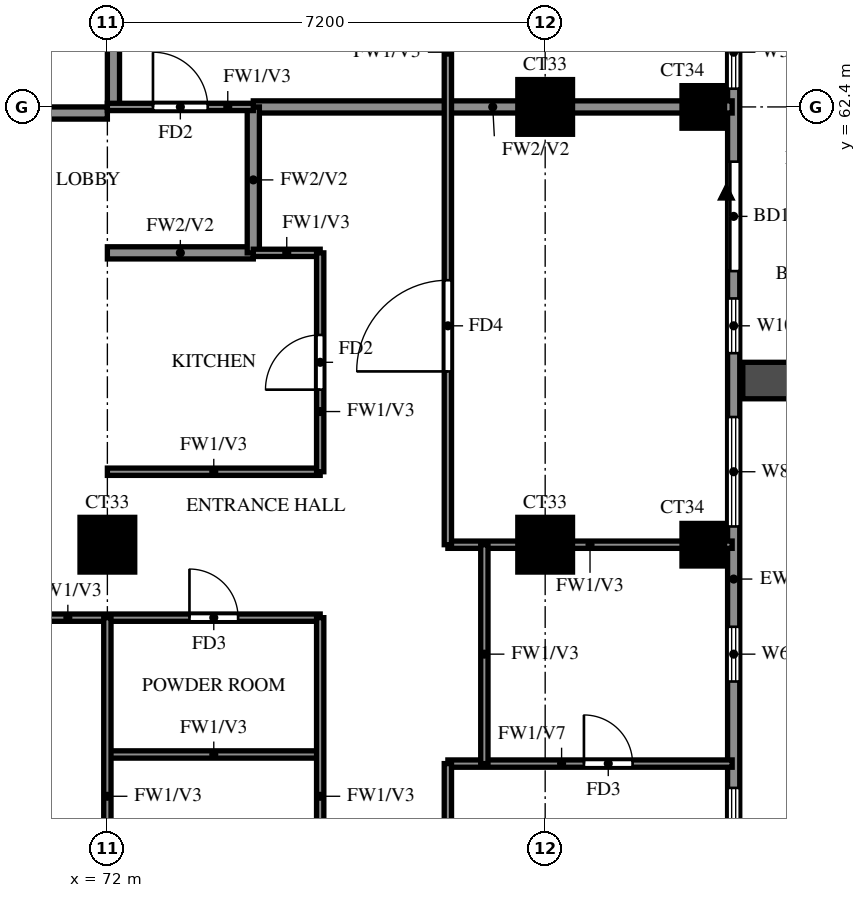
"""IFC4 building model, lengths in metres.
Left out: names, types, materials, properties, quantities, classifications, styles, units other than length and angle.
Written with IfcOpenShell. Run it as: python <this file> out.ifc"""

import sys

from ifc_helpers import new_model, si_unit, direction, frame, frame_2d, origin, origin_2d, place, context, subcontext, project, spatial, rectangle, extrude, source, transform, mapped, element, fill, save


model = new_model("IFC4")
c1 = context("Model", 3, precision=1e-05, world=origin(), true_north=direction((0.0, 1.0)))
c2 = subcontext(c1, "Body", "Model", "MODEL_VIEW")
j1 = project(units=[si_unit("LENGTHUNIT", "METRE"), si_unit("PLANEANGLEUNIT", "RADIAN")], contexts=[c1])
p1 = place(None, origin())
s1 = spatial("IfcSite", under=j1, at=p1, CompositionType="ELEMENT")
p2 = place(p1, origin())
s2 = spatial("IfcBuilding", under=s1, at=p2, CompositionType="ELEMENT")
p3 = place(p2, frame((0.0, 0.0, 222.0)))
s3 = spatial("IfcBuildingStorey", under=s2, at=p3, CompositionType="ELEMENT", Elevation=222.0)
m1 = source(origin(), c2, "Body", "SweptSolid", [
    extrude(rectangle(XDim=0.9, YDim=0.9, at=origin_2d()), origin(), (0.0, 0.0, 1.0), 3.22),
])
for number, where, z_axis, x_axis in (
    (1, (72.0, 55.2, 0.0), (0.0, 0.0, 1.0), (1.0, 0.0, 0.0)),
    (2, (79.2, 55.2, 0.0), (0.0, 0.0, 1.0), (1.0, 0.0, 0.0)),
):
    element("IfcColumn", number, at=place(p3, frame(where, z_axis=z_axis, x_axis=x_axis)), inside=s3, PredefinedType="COLUMN", context=c2, shape_type="MappedRepresentation", body=[
        mapped(m1, transform((0.0, 0.0, 0.0))),
    ])
m2 = source(origin(), c2, "Body", "SweptSolid", [
    extrude(rectangle(XDim=0.7, YDim=0.7, at=origin_2d()), origin(), (0.0, 0.0, 1.0), 3.22),
])
p4 = place(p3, frame((81.8, 55.2, 0.0), z_axis=(0.0, 0.0, 1.0), x_axis=(1.0, 0.0, 0.0)))
e3 = element("IfcColumn", 3, at=p4, inside=s3, PredefinedType="COLUMN", context=c2, shape_type="MappedRepresentation", body=[
    mapped(m2, transform((0.0, 0.0, 0.0))),
])
p5 = place(p3, frame((79.2, 62.4, 0.0), z_axis=(0.0, 0.0, 1.0), x_axis=(1.0, 0.0, 0.0)))
e4 = element("IfcColumn", 4, at=p5, inside=s3, PredefinedType="COLUMN", context=c2, shape_type="MappedRepresentation", body=[
    mapped(m1, transform((0.0, 0.0, 0.0))),
])
p6 = place(p3, frame((81.8, 62.4, 0.0), z_axis=(0.0, 0.0, 1.0), x_axis=(1.0, 0.0, 0.0)))
e5 = element("IfcColumn", 5, at=p6, inside=s3, PredefinedType="COLUMN", context=c2, shape_type="MappedRepresentation", body=[
    mapped(m2, transform((0.0, 0.0, 0.0))),
])
p7 = place(p3, frame((82.3, 48.2, 0.0), z_axis=(0.0, 0.0, 1.0), x_axis=(0.0, 1.0, 0.0)))
e6 = element("IfcWall", 6, at=p7, inside=s3, PredefinedType="SOLIDWALL", context=c2, shape_type="SweptSolid", body=[
    extrude(rectangle(XDim=28.6, YDim=0.2, at=frame_2d((14.3, 0.0))), origin(), (0.0, 0.0, 1.0), 3.22),
])
p8 = place(p7, frame((11.5, 0.0, 0.0)))
e7 = element("IfcOpeningElement", 7, at=p8, cuts=e6, PredefinedType="OPENING", context=c2, shape_type="SweptSolid", body=[
    extrude(rectangle(XDim=1.8, YDim=2.4, at=frame_2d((0.9, 1.2))), frame((0.0, 0.11, 0.0), z_axis=(0.0, -1.0, 0.0), x_axis=(1.0, 0.0, 0.0)), (0.0, 0.0, 1.0), 0.22),
])
p9 = place(p7, frame((0.6, 0.0, 0.6)))
e8 = element("IfcOpeningElement", 8, at=p9, cuts=e6, PredefinedType="OPENING", context=c2, shape_type="SweptSolid", body=[
    extrude(rectangle(XDim=2.4, YDim=2.4, at=frame_2d((1.2, 1.2))), frame((0.0, 0.11, 0.0), z_axis=(0.0, -1.0, 0.0), x_axis=(1.0, 0.0, 0.0)), (0.0, 0.0, 1.0), 0.22),
])
p10 = place(p7, frame((4.75, 0.0, 1.5)))
e9 = element("IfcOpeningElement", 9, at=p10, cuts=e6, PredefinedType="OPENING", context=c2, shape_type="SweptSolid", body=[
    extrude(rectangle(XDim=0.9, YDim=0.9, at=frame_2d((0.45, 0.45))), frame((0.0, 0.11, 0.0), z_axis=(0.0, -1.0, 0.0), x_axis=(1.0, 0.0, 0.0)), (0.0, 0.0, 1.0), 0.22),
])
p11 = place(p7, frame((7.3, 0.0, 0.6)))
e10 = element("IfcOpeningElement", 10, at=p11, cuts=e6, PredefinedType="OPENING", context=c2, shape_type="SweptSolid", body=[
    extrude(rectangle(XDim=1.8, YDim=2.4, at=frame_2d((0.9, 1.2))), frame((0.0, 0.11, 0.0), z_axis=(0.0, -1.0, 0.0), x_axis=(1.0, 0.0, 0.0)), (0.0, 0.0, 1.0), 0.22),
])
p12 = place(p7, frame((10.15, 0.0, 0.6)))
e11 = element("IfcOpeningElement", 11, at=p12, cuts=e6, PredefinedType="OPENING", context=c2, shape_type="SweptSolid", body=[
    extrude(rectangle(XDim=0.9, YDim=2.4, at=frame_2d((0.45, 1.2))), frame((0.0, 0.11, 0.0), z_axis=(0.0, -1.0, 0.0), x_axis=(1.0, 0.0, 0.0)), (0.0, 0.0, 1.0), 0.22),
])
p13 = place(p7, frame((14.5, 0.0, 0.6)))
e12 = element("IfcOpeningElement", 12, at=p13, cuts=e6, PredefinedType="OPENING", context=c2, shape_type="SweptSolid", body=[
    extrude(rectangle(XDim=1.2, YDim=2.4, at=frame_2d((0.6, 1.2))), frame((0.0, 0.11, 0.0), z_axis=(0.0, -1.0, 0.0), x_axis=(1.0, 0.0, 0.0)), (0.0, 0.0, 1.0), 0.22),
])
p14 = place(p7, frame((16.75, 0.0, 0.6)))
e13 = element("IfcOpeningElement", 13, at=p14, cuts=e6, PredefinedType="OPENING", context=c2, shape_type="SweptSolid", body=[
    extrude(rectangle(XDim=0.9, YDim=2.4, at=frame_2d((0.45, 1.2))), frame((0.0, 0.11, 0.0), z_axis=(0.0, -1.0, 0.0), x_axis=(1.0, 0.0, 0.0)), (0.0, 0.0, 1.0), 0.22),
])
p15 = place(p7, frame((18.4, 0.0, 0.6)))
e14 = element("IfcOpeningElement", 14, at=p15, cuts=e6, PredefinedType="OPENING", context=c2, shape_type="SweptSolid", body=[
    extrude(rectangle(XDim=2.4, YDim=2.4, at=frame_2d((1.2, 1.2))), frame((0.0, 0.11, 0.0), z_axis=(0.0, -1.0, 0.0), x_axis=(1.0, 0.0, 0.0)), (0.0, 0.0, 1.0), 0.22),
])
p16 = place(p7, frame((22.0, 0.0, 0.6)))
e15 = element("IfcOpeningElement", 15, at=p16, cuts=e6, PredefinedType="OPENING", context=c2, shape_type="SweptSolid", body=[
    extrude(rectangle(XDim=2.4, YDim=2.4, at=frame_2d((1.2, 1.2))), frame((0.0, 0.11, 0.0), z_axis=(0.0, -1.0, 0.0), x_axis=(1.0, 0.0, 0.0)), (0.0, 0.0, 1.0), 0.22),
])
p17 = place(p7, frame((25.5, 0.0, 0.6)))
e16 = element("IfcOpeningElement", 16, at=p17, cuts=e6, PredefinedType="OPENING", context=c2, shape_type="SweptSolid", body=[
    extrude(rectangle(XDim=2.4, YDim=2.4, at=frame_2d((1.2, 1.2))), frame((0.0, 0.11, 0.0), z_axis=(0.0, -1.0, 0.0), x_axis=(1.0, 0.0, 0.0)), (0.0, 0.0, 1.0), 0.22),
])
p18 = place(p3, frame((82.45, 57.9, 0.0), z_axis=(0.0, 0.0, 1.0), x_axis=(1.0, 0.0, 0.0)))
e17 = element("IfcWall", 17, at=p18, inside=s3, PredefinedType="SOLIDWALL", context=c2, shape_type="SweptSolid", body=[
    extrude(rectangle(XDim=2.65, YDim=0.6, at=frame_2d((1.325, 0.0))), origin(), (0.0, 0.0, 1.0), 2.85),
])
p19 = place(p3, frame((67.2, 62.3, 0.0), z_axis=(0.0, 0.0, 1.0), x_axis=(1.0, 0.0, 0.0)))
e18 = element("IfcWall", 18, at=p19, inside=s3, PredefinedType="SOLIDWALL", context=c2, shape_type="SweptSolid", body=[
    extrude(rectangle(XDim=4.8, YDim=0.2, at=frame_2d((2.4, 0.0))), origin(), (0.0, 0.0, 1.0), 3.22),
])
p20 = place(p3, frame((72.1, 62.4, 0.0), z_axis=(0.0, 0.0, 1.0), x_axis=(0.0, 1.0, 0.0)))
e19 = element("IfcWall", 19, at=p20, inside=s3, PredefinedType="SOLIDWALL", context=c2, shape_type="SweptSolid", body=[
    extrude(rectangle(XDim=15.6, YDim=0.2, at=frame_2d((7.8, 0.0))), origin(), (0.0, 0.0, 1.0), 3.22),
])
p21 = place(p3, frame((72.0, 60.0, 0.0), z_axis=(0.0, 0.0, 1.0), x_axis=(1.0, 0.0, 0.0)))
e20 = element("IfcWall", 20, at=p21, inside=s3, PredefinedType="SOLIDWALL", context=c2, shape_type="SweptSolid", body=[
    extrude(rectangle(XDim=2.4, YDim=0.2, at=frame_2d((1.2, 0.0))), origin(), (0.0, 0.0, 1.0), 3.22),
])
p22 = place(p3, frame((74.4, 62.4, 0.0), z_axis=(0.0, 0.0, 1.0), x_axis=(1.0, 0.0, 0.0)))
e21 = element("IfcWall", 21, at=p22, inside=s3, PredefinedType="SOLIDWALL", context=c2, shape_type="SweptSolid", body=[
    extrude(rectangle(XDim=7.875, YDim=0.2, at=frame_2d((3.938, 0.0))), origin(), (0.0, 0.0, 1.0), 3.22),
])
p23 = place(p3, frame((74.4, 60.0, 0.0), z_axis=(0.0, 0.0, 1.0), x_axis=(0.0, 1.0, 0.0)))
e22 = element("IfcWall", 22, at=p23, inside=s3, PredefinedType="SOLIDWALL", context=c2, shape_type="SweptSolid", body=[
    extrude(rectangle(XDim=2.4, YDim=0.2, at=frame_2d((1.2, 0.0))), origin(), (0.0, 0.0, 1.0), 3.22),
])
p24 = place(p3, frame((77.6, 51.6, 0.0), z_axis=(0.0, 0.0, 1.0), x_axis=(1.0, 0.0, 0.0)))
e23 = element("IfcWall", 23, at=p24, inside=s3, PredefinedType="PARTITIONING", context=c2, shape_type="SweptSolid", body=[
    extrude(rectangle(XDim=4.675, YDim=0.12, at=frame_2d((2.337, 0.0))), origin(), (0.0, 0.0, 1.0), 2.32),
])
p25 = place(p24, frame((2.238, 0.0, 0.0)))
e24 = element("IfcOpeningElement", 24, at=p25, cuts=e23, PredefinedType="OPENING", context=c2, shape_type="SweptSolid", body=[
    extrude(rectangle(XDim=0.8, YDim=2.1, at=frame_2d((0.4, 1.05))), frame((0.0, 0.07, 0.0), z_axis=(0.0, -1.0, 0.0), x_axis=(1.0, 0.0, 0.0)), (0.0, 0.0, 1.0), 0.14),
])
p26 = place(p3, frame((72.0, 51.75, 0.0), z_axis=(0.0, 0.0, 1.0), x_axis=(1.0, 0.0, 0.0)))
e25 = element("IfcWall", 25, at=p26, inside=s3, PredefinedType="PARTITIONING", context=c2, shape_type="SweptSolid", body=[
    extrude(rectangle(XDim=3.5, YDim=0.12, at=frame_2d((1.75, 0.0))), origin(), (0.0, 0.0, 1.0), 3.22),
])
p27 = place(p3, frame((67.2, 54.0, 0.0), z_axis=(0.0, 0.0, 1.0), x_axis=(1.0, 0.0, 0.0)))
e26 = element("IfcWall", 26, at=p27, inside=s3, PredefinedType="PARTITIONING", context=c2, shape_type="SweptSolid", body=[
    extrude(rectangle(XDim=8.3, YDim=0.12, at=frame_2d((4.15, 0.0))), origin(), (0.0, 0.0, 1.0), 3.22),
])
p28 = place(p27, frame((6.15, 0.0, 0.0)))
e27 = element("IfcOpeningElement", 27, at=p28, cuts=e26, PredefinedType="OPENING", context=c2, shape_type="SweptSolid", body=[
    extrude(rectangle(XDim=0.8, YDim=2.1, at=frame_2d((0.4, 1.05))), frame((0.0, 0.07, 0.0), z_axis=(0.0, -1.0, 0.0), x_axis=(1.0, 0.0, 0.0)), (0.0, 0.0, 1.0), 0.14),
])
p29 = place(p27, frame((1.95, 0.0, 0.0)))
e28 = element("IfcOpeningElement", 28, at=p29, cuts=e26, PredefinedType="OPENING", context=c2, shape_type="SweptSolid", body=[
    extrude(rectangle(XDim=0.9, YDim=2.1, at=frame_2d((0.45, 1.05))), frame((0.0, 0.07, 0.0), z_axis=(0.0, -1.0, 0.0), x_axis=(1.0, 0.0, 0.0)), (0.0, 0.0, 1.0), 0.14),
])
p30 = place(p3, frame((77.6, 55.2, 0.0), z_axis=(0.0, 0.0, 1.0), x_axis=(1.0, 0.0, 0.0)))
e29 = element("IfcWall", 29, at=p30, inside=s3, PredefinedType="PARTITIONING", context=c2, shape_type="SweptSolid", body=[
    extrude(rectangle(XDim=4.675, YDim=0.12, at=frame_2d((2.337, 0.0))), origin(), (0.0, 0.0, 1.0), 3.22),
])
p31 = place(p3, frame((72.0, 56.4, 0.0), z_axis=(0.0, 0.0, 1.0), x_axis=(1.0, 0.0, 0.0)))
e30 = element("IfcWall", 30, at=p31, inside=s3, PredefinedType="PARTITIONING", context=c2, shape_type="SweptSolid", body=[
    extrude(rectangle(XDim=3.5, YDim=0.12, at=frame_2d((1.75, 0.0))), origin(), (0.0, 0.0, 1.0), 3.22),
])
p32 = place(p3, frame((74.4, 60.0, 0.0), z_axis=(0.0, 0.0, 1.0), x_axis=(1.0, 0.0, 0.0)))
e31 = element("IfcWall", 31, at=p32, inside=s3, PredefinedType="PARTITIONING", context=c2, shape_type="SweptSolid", body=[
    extrude(rectangle(XDim=1.1, YDim=0.12, at=frame_2d((0.55, 0.0))), origin(), (0.0, 0.0, 1.0), 3.22),
])
p33 = place(p3, frame((72.0, 62.4, 0.0), z_axis=(0.0, 0.0, 1.0), x_axis=(1.0, 0.0, 0.0)))
e32 = element("IfcWall", 32, at=p33, inside=s3, PredefinedType="PARTITIONING", context=c2, shape_type="SweptSolid", body=[
    extrude(rectangle(XDim=2.4, YDim=0.12, at=frame_2d((1.2, 0.0))), origin(), (0.0, 0.0, 1.0), 3.22),
])
p34 = place(p33, frame((0.75, 0.0, 0.0)))
e33 = element("IfcOpeningElement", 33, at=p34, cuts=e32, PredefinedType="OPENING", context=c2, shape_type="SweptSolid", body=[
    extrude(rectangle(XDim=0.9, YDim=2.1, at=frame_2d((0.45, 1.05))), frame((0.0, 0.07, 0.0), z_axis=(0.0, -1.0, 0.0), x_axis=(1.0, 0.0, 0.0)), (0.0, 0.0, 1.0), 0.14),
])
p35 = place(p3, frame((72.0, 48.125, 0.0), z_axis=(0.0, 0.0, 1.0), x_axis=(0.0, 1.0, 0.0)))
e34 = element("IfcWall", 34, at=p35, inside=s3, PredefinedType="PARTITIONING", context=c2, shape_type="SweptSolid", body=[
    extrude(rectangle(XDim=5.875, YDim=0.12, at=frame_2d((2.938, 0.0))), origin(), (0.0, 0.0, 1.0), 3.22),
])
p36 = place(p3, frame((75.5, 48.125, 0.0), z_axis=(0.0, 0.0, 1.0), x_axis=(0.0, 1.0, 0.0)))
e35 = element("IfcWall", 35, at=p36, inside=s3, PredefinedType="PARTITIONING", context=c2, shape_type="SweptSolid", body=[
    extrude(rectangle(XDim=5.875, YDim=0.12, at=frame_2d((2.938, 0.0))), origin(), (0.0, 0.0, 1.0), 3.22),
])
p37 = place(p36, frame((1.413, 0.0, 0.0)))
e36 = element("IfcOpeningElement", 36, at=p37, cuts=e35, PredefinedType="OPENING", context=c2, shape_type="SweptSolid", body=[
    extrude(rectangle(XDim=0.8, YDim=2.1, at=frame_2d((0.4, 1.05))), frame((0.0, 0.07, 0.0), z_axis=(0.0, -1.0, 0.0), x_axis=(1.0, 0.0, 0.0)), (0.0, 0.0, 1.0), 0.14),
])
p38 = place(p3, frame((75.5, 56.4, 0.0), z_axis=(0.0, 0.0, 1.0), x_axis=(0.0, 1.0, 0.0)))
e37 = element("IfcWall", 37, at=p38, inside=s3, PredefinedType="PARTITIONING", context=c2, shape_type="SweptSolid", body=[
    extrude(rectangle(XDim=3.6, YDim=0.12, at=frame_2d((1.8, 0.0))), origin(), (0.0, 0.0, 1.0), 3.22),
])
p39 = place(p38, frame((1.35, 0.0, 0.0)))
e38 = element("IfcOpeningElement", 38, at=p39, cuts=e37, PredefinedType="OPENING", context=c2, shape_type="SweptSolid", body=[
    extrude(rectangle(XDim=0.9, YDim=2.1, at=frame_2d((0.45, 1.05))), frame((0.0, 0.07, 0.0), z_axis=(0.0, -1.0, 0.0), x_axis=(1.0, 0.0, 0.0)), (0.0, 0.0, 1.0), 0.14),
])
p40 = place(p3, frame((77.6, 48.125, 0.0), z_axis=(0.0, 0.0, 1.0), x_axis=(0.0, 1.0, 0.0)))
e39 = element("IfcWall", 39, at=p40, inside=s3, PredefinedType="PARTITIONING", context=c2, shape_type="SweptSolid", body=[
    extrude(rectangle(XDim=3.475, YDim=0.12, at=frame_2d((1.738, 0.0))), origin(), (0.0, 0.0, 1.0), 3.22),
])
p41 = place(p40, frame((1.288, 0.0, 0.0)))
e40 = element("IfcOpeningElement", 40, at=p41, cuts=e39, PredefinedType="OPENING", context=c2, shape_type="SweptSolid", body=[
    extrude(rectangle(XDim=0.9, YDim=2.1, at=frame_2d((0.45, 1.05))), frame((0.0, 0.07, 0.0), z_axis=(0.0, -1.0, 0.0), x_axis=(1.0, 0.0, 0.0)), (0.0, 0.0, 1.0), 0.14),
])
p42 = place(p3, frame((77.6, 55.2, 0.0), z_axis=(0.0, 0.0, 1.0), x_axis=(0.0, 1.0, 0.0)))
e41 = element("IfcWall", 41, at=p42, inside=s3, PredefinedType="PARTITIONING", context=c2, shape_type="SweptSolid", body=[
    extrude(rectangle(XDim=18.0, YDim=0.12, at=frame_2d((9.0, 0.0))), origin(), (0.0, 0.0, 1.0), 3.22),
])
p43 = place(p42, frame((2.85, 0.0, 0.0)))
e42 = element("IfcOpeningElement", 42, at=p43, cuts=e41, PredefinedType="OPENING", context=c2, shape_type="SweptSolid", body=[
    extrude(rectangle(XDim=1.5, YDim=2.1, at=frame_2d((0.75, 1.05))), frame((0.0, 0.07, 0.0), z_axis=(0.0, -1.0, 0.0), x_axis=(1.0, 0.0, 0.0)), (0.0, 0.0, 1.0), 0.14),
])
p44 = place(p42, frame((8.55, 0.0, 0.0)))
e43 = element("IfcOpeningElement", 43, at=p44, cuts=e41, PredefinedType="OPENING", context=c2, shape_type="SweptSolid", body=[
    extrude(rectangle(XDim=0.9, YDim=2.1, at=frame_2d((0.45, 1.05))), frame((0.0, 0.07, 0.0), z_axis=(0.0, -1.0, 0.0), x_axis=(1.0, 0.0, 0.0)), (0.0, 0.0, 1.0), 0.14),
])
p45 = place(p42, frame((12.15, 0.0, 0.0)))
e44 = element("IfcOpeningElement", 44, at=p45, cuts=e41, PredefinedType="OPENING", context=c2, shape_type="SweptSolid", body=[
    extrude(rectangle(XDim=0.9, YDim=2.1, at=frame_2d((0.45, 1.05))), frame((0.0, 0.07, 0.0), z_axis=(0.0, -1.0, 0.0), x_axis=(1.0, 0.0, 0.0)), (0.0, 0.0, 1.0), 0.14),
])
p46 = place(p42, frame((15.75, 0.0, 0.0)))
e45 = element("IfcOpeningElement", 45, at=p46, cuts=e41, PredefinedType="OPENING", context=c2, shape_type="SweptSolid", body=[
    extrude(rectangle(XDim=0.9, YDim=2.1, at=frame_2d((0.45, 1.05))), frame((0.0, 0.07, 0.0), z_axis=(0.0, -1.0, 0.0), x_axis=(1.0, 0.0, 0.0)), (0.0, 0.0, 1.0), 0.14),
])
p47 = place(p3, frame((78.2, 51.6, 0.0), z_axis=(0.0, 0.0, 1.0), x_axis=(0.0, 1.0, 0.0)))
e46 = element("IfcWall", 46, at=p47, inside=s3, PredefinedType="PARTITIONING", context=c2, shape_type="SweptSolid", body=[
    extrude(rectangle(XDim=3.6, YDim=0.12, at=frame_2d((1.8, 0.0))), origin(), (0.0, 0.0, 1.0), 3.22),
])
p48 = place(p8, origin())
e47 = element("IfcDoor", 47, at=p48, inside=s3, OperationType="DOUBLE_DOOR_SLIDING", PredefinedType="DOOR", context=c2, shape_type="SweptSolid", body=[
    extrude(rectangle(XDim=1.8, YDim=2.4, at=frame_2d((0.9, 1.2))), frame((0.0, 0.025, 0.0), z_axis=(0.0, -1.0, 0.0), x_axis=(1.0, 0.0, 0.0)), (0.0, 0.0, 1.0), 0.05),
])
fill(e7, e47)
p49 = place(p9, origin())
e48 = element("IfcWindow", 48, at=p49, inside=s3, PartitioningType="DOUBLE_PANEL_VERTICAL", PredefinedType="WINDOW", context=c2, shape_type="SweptSolid", body=[
    extrude(rectangle(XDim=2.4, YDim=2.4, at=frame_2d((1.2, 1.2))), frame((0.0, 0.03, 0.0), z_axis=(0.0, -1.0, 0.0), x_axis=(1.0, 0.0, 0.0)), (0.0, 0.0, 1.0), 0.06),
])
fill(e8, e48)
p50 = place(p10, origin())
e49 = element("IfcWindow", 49, at=p50, inside=s3, PartitioningType="SINGLE_PANEL", PredefinedType="WINDOW", context=c2, shape_type="SweptSolid", body=[
    extrude(rectangle(XDim=0.9, YDim=0.9, at=frame_2d((0.45, 0.45))), frame((0.0, 0.03, 0.0), z_axis=(0.0, -1.0, 0.0), x_axis=(1.0, 0.0, 0.0)), (0.0, 0.0, 1.0), 0.06),
])
fill(e9, e49)
p51 = place(p11, origin())
e50 = element("IfcWindow", 50, at=p51, inside=s3, PartitioningType="DOUBLE_PANEL_VERTICAL", PredefinedType="WINDOW", context=c2, shape_type="SweptSolid", body=[
    extrude(rectangle(XDim=1.8, YDim=2.4, at=frame_2d((0.9, 1.2))), frame((0.0, 0.03, 0.0), z_axis=(0.0, -1.0, 0.0), x_axis=(1.0, 0.0, 0.0)), (0.0, 0.0, 1.0), 0.06),
])
fill(e10, e50)
p52 = place(p12, origin())
e51 = element("IfcWindow", 51, at=p52, inside=s3, PartitioningType="SINGLE_PANEL", PredefinedType="WINDOW", context=c2, shape_type="SweptSolid", body=[
    extrude(rectangle(XDim=0.9, YDim=2.4, at=frame_2d((0.45, 1.2))), frame((0.0, 0.03, 0.0), z_axis=(0.0, -1.0, 0.0), x_axis=(1.0, 0.0, 0.0)), (0.0, 0.0, 1.0), 0.06),
])
fill(e11, e51)
p53 = place(p13, origin())
e52 = element("IfcWindow", 52, at=p53, inside=s3, PartitioningType="SINGLE_PANEL", PredefinedType="WINDOW", context=c2, shape_type="SweptSolid", body=[
    extrude(rectangle(XDim=1.2, YDim=2.4, at=frame_2d((0.6, 1.2))), frame((0.0, 0.03, 0.0), z_axis=(0.0, -1.0, 0.0), x_axis=(1.0, 0.0, 0.0)), (0.0, 0.0, 1.0), 0.06),
])
fill(e12, e52)
p54 = place(p25, origin())
e53 = element("IfcDoor", 53, at=p54, inside=s3, OperationType="SINGLE_SWING_LEFT", PredefinedType="DOOR", context=c2, shape_type="SweptSolid", body=[
    extrude(rectangle(XDim=0.8, YDim=2.1, at=frame_2d((0.4, 1.05))), frame((0.0, 0.025, 0.0), z_axis=(0.0, -1.0, 0.0), x_axis=(1.0, 0.0, 0.0)), (0.0, 0.0, 1.0), 0.05),
])
fill(e24, e53)
p55 = place(p43, origin())
e54 = element("IfcDoor", 54, at=p55, inside=s3, OperationType="SINGLE_SWING_LEFT", PredefinedType="DOOR", context=c2, shape_type="SweptSolid", body=[
    extrude(rectangle(XDim=1.5, YDim=2.1, at=frame_2d((0.75, 1.05))), frame((0.0, 0.025, 0.0), z_axis=(0.0, -1.0, 0.0), x_axis=(1.0, 0.0, 0.0)), (0.0, 0.0, 1.0), 0.05),
])
fill(e42, e54)
p56 = place(p28, origin())
e55 = element("IfcDoor", 55, at=p56, inside=s3, OperationType="SINGLE_SWING_LEFT", PredefinedType="DOOR", context=c2, shape_type="SweptSolid", body=[
    extrude(rectangle(XDim=0.8, YDim=2.1, at=frame_2d((0.4, 1.05))), frame((0.0, 0.025, 0.0), z_axis=(0.0, -1.0, 0.0), x_axis=(1.0, 0.0, 0.0)), (0.0, 0.0, 1.0), 0.05),
])
fill(e27, e55)
p57 = place(p39, origin())
e56 = element("IfcDoor", 56, at=p57, inside=s3, OperationType="SINGLE_SWING_LEFT", PredefinedType="DOOR", context=c2, shape_type="SweptSolid", body=[
    extrude(rectangle(XDim=0.9, YDim=2.1, at=frame_2d((0.45, 1.05))), frame((0.0, 0.025, 0.0), z_axis=(0.0, -1.0, 0.0), x_axis=(1.0, 0.0, 0.0)), (0.0, 0.0, 1.0), 0.05),
])
fill(e38, e56)
p58 = place(p34, origin())
e57 = element("IfcDoor", 57, at=p58, inside=s3, OperationType="SINGLE_SWING_RIGHT", PredefinedType="DOOR", context=c2, shape_type="SweptSolid", body=[
    extrude(rectangle(XDim=0.9, YDim=2.1, at=frame_2d((0.45, 1.05))), frame((0.0, 0.025, 0.0), z_axis=(0.0, -1.0, 0.0), x_axis=(1.0, 0.0, 0.0)), (0.0, 0.0, 1.0), 0.05),
])
fill(e33, e57)
save(model, sys.argv[1])
